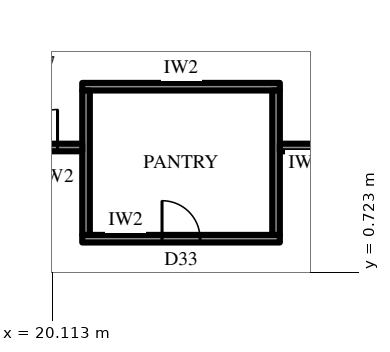
"""IFC4 building model, lengths in metres.
Left out: names, types, materials, properties, quantities, classifications, styles, units other than length and angle.
Written with IfcOpenShell. Run it as: python <this file> out.ifc"""

import sys

from ifc_helpers import new_model, si_unit, direction, frame, frame_2d, origin, place, context, subcontext, project, spatial, rectangle, extrude, element, fill, save


model = new_model("IFC4")
c1 = context("Model", 3, precision=1e-05, world=origin(), true_north=direction((0.0, 1.0)))
c2 = subcontext(c1, "Body", "Model", "MODEL_VIEW")
j1 = project(units=[si_unit("LENGTHUNIT", "METRE"), si_unit("PLANEANGLEUNIT", "RADIAN")], contexts=[c1])
p1 = place(None, origin())
s1 = spatial("IfcSite", under=j1, at=p1, CompositionType="ELEMENT")
p2 = place(p1, origin())
s2 = spatial("IfcBuilding", under=s1, at=p2, CompositionType="ELEMENT")
p3 = place(p2, frame((0.0, 0.0, 132.1)))
s3 = spatial("IfcBuildingStorey", under=s2, at=p3, CompositionType="ELEMENT", Elevation=132.1)
p4 = place(p3, frame((20.9, 1.6, 0.0), z_axis=(0.0, 0.0, 1.0), x_axis=(1.0, 0.0, 0.0)))
e1 = element("IfcWall", 1, at=p4, inside=s3, PredefinedType="PARTITIONING", context=c2, shape_type="SweptSolid", body=[
    extrude(rectangle(XDim=5.2, YDim=0.2, at=frame_2d((2.6, 0.0))), origin(), (0.0, 0.0, 1.0), 4.0),
])
p5 = place(p4, frame((2.1, 0.0, 0.0)))
e2 = element("IfcOpeningElement", 2, at=p5, cuts=e1, PredefinedType="OPENING", context=c2, shape_type="SweptSolid", body=[
    extrude(rectangle(XDim=1.0, YDim=2.2, at=frame_2d((0.5, 1.1))), frame((0.0, 0.11, 0.0), z_axis=(0.0, -1.0, 0.0), x_axis=(1.0, 0.0, 0.0)), (0.0, 0.0, 1.0), 0.22),
])
p6 = place(p3, frame((20.9, 5.6, 0.0), z_axis=(0.0, 0.0, 1.0), x_axis=(1.0, 0.0, 0.0)))
e3 = element("IfcWall", 3, at=p6, inside=s3, PredefinedType="PARTITIONING", context=c2, shape_type="SweptSolid", body=[
    extrude(rectangle(XDim=5.2, YDim=0.2, at=frame_2d((2.6, 0.0))), origin(), (0.0, 0.0, 1.0), 4.0),
])
for number, where, z_axis, x_axis in (
    (4, (21.0, 1.7, 0.0), (0.0, 0.0, 1.0), (0.0, 1.0, 0.0)),
    (5, (26.0, 1.7, 0.0), (0.0, 0.0, 1.0), (0.0, 1.0, 0.0)),
):
    element("IfcWall", number, at=place(p3, frame(where, z_axis=z_axis, x_axis=x_axis)), inside=s3, PredefinedType="PARTITIONING", context=c2, shape_type="SweptSolid", body=[
        extrude(rectangle(XDim=3.8, YDim=0.2, at=frame_2d((1.9, 0.0))), origin(), (0.0, 0.0, 1.0), 4.0),
    ])
p7 = place(p3, frame((18.6, 4.0, 0.0), z_axis=(0.0, 0.0, 1.0), x_axis=(1.0, 0.0, 0.0)))
e6 = element("IfcWall", 6, at=p7, inside=s3, PredefinedType="PARTITIONING", context=c2, shape_type="SweptSolid", body=[
    extrude(rectangle(XDim=2.3, YDim=0.2, at=frame_2d((1.15, 0.0))), origin(), (0.0, 0.0, 1.0), 4.0),
])
p8 = place(p7, frame((0.65, 0.0, 0.0)))
e7 = element("IfcOpeningElement", 7, at=p8, cuts=e6, PredefinedType="OPENING", context=c2, shape_type="SweptSolid", body=[
    extrude(rectangle(XDim=1.0, YDim=2.2, at=frame_2d((0.5, 1.1))), frame((0.0, 0.11, 0.0), z_axis=(0.0, -1.0, 0.0), x_axis=(1.0, 0.0, 0.0)), (0.0, 0.0, 1.0), 0.22),
])
p9 = place(p3, frame((26.1, 4.0, 0.0), z_axis=(0.0, 0.0, 1.0), x_axis=(1.0, 0.0, 0.0)))
e8 = element("IfcWall", 8, at=p9, inside=s3, PredefinedType="PARTITIONING", context=c2, shape_type="SweptSolid", body=[
    extrude(rectangle(XDim=7.709, YDim=0.2, at=frame_2d((3.855, 0.0))), origin(), (0.0, 0.0, 1.0), 4.0),
])
p10 = place(p5, origin())
e9 = element("IfcDoor", 9, at=p10, inside=s3, OperationType="SINGLE_SWING_RIGHT", PredefinedType="DOOR", context=c2, shape_type="SweptSolid", body=[
    extrude(rectangle(XDim=1.0, YDim=2.2, at=frame_2d((0.5, 1.1))), frame((0.0, 0.025, 0.0), z_axis=(0.0, -1.0, 0.0), x_axis=(1.0, 0.0, 0.0)), (0.0, 0.0, 1.0), 0.05),
])
fill(e2, e9)
p11 = place(p8, origin())
e10 = element("IfcDoor", 10, at=p11, inside=s3, OperationType="SINGLE_SWING_LEFT", PredefinedType="DOOR", context=c2, shape_type="SweptSolid", body=[
    extrude(rectangle(XDim=1.0, YDim=2.2, at=frame_2d((0.5, 1.1))), frame((0.0, 0.025, 0.0), z_axis=(0.0, -1.0, 0.0), x_axis=(1.0, 0.0, 0.0)), (0.0, 0.0, 1.0), 0.05),
])
fill(e7, e10)
save(model, sys.argv[1])
